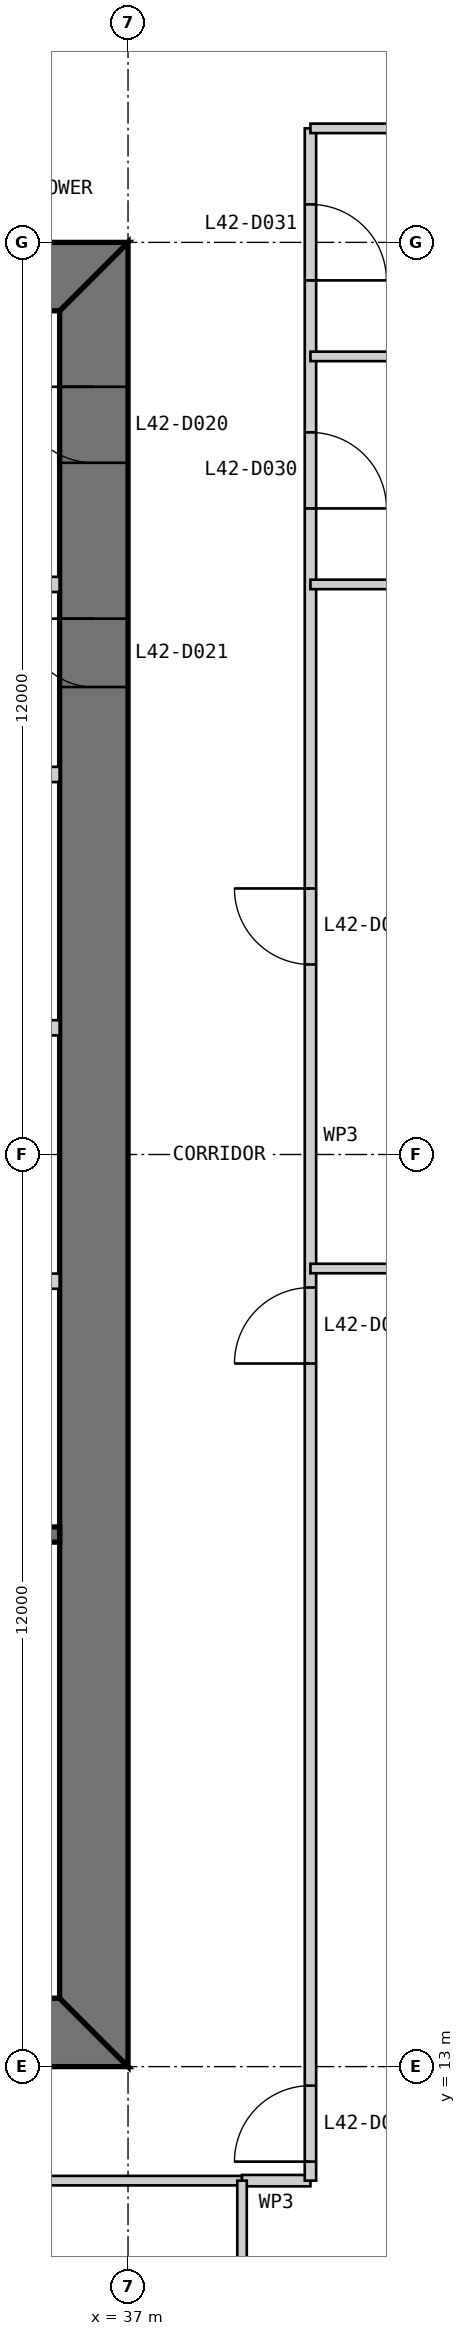
"""IFC4 building model, lengths in metres.
Left out: names, types, materials, properties, quantities, classifications, styles, units other than length and angle.
Written with IfcOpenShell. Run it as: python <this file> out.ifc"""

import sys

from ifc_helpers import new_model, si_unit, direction, frame, frame_2d, origin, place, context, subcontext, project, spatial, polyline, rectangle, outline, extrude, element, fill, save


model = new_model("IFC4")
c1 = context("Model", 3, precision=1e-05, world=origin(), true_north=direction((0.0, 1.0)))
c2 = subcontext(c1, "Body", "Model", "MODEL_VIEW")
j1 = project(units=[si_unit("LENGTHUNIT", "METRE"), si_unit("PLANEANGLEUNIT", "RADIAN")], contexts=[c1])
p1 = place(None, origin())
s1 = spatial("IfcSite", under=j1, at=p1, CompositionType="ELEMENT")
p2 = place(p1, origin())
s2 = spatial("IfcBuilding", under=s1, at=p2, CompositionType="ELEMENT")
p3 = place(p2, frame((0.0, 0.0, 181.8)))
s3 = spatial("IfcBuildingStorey", under=s2, at=p3, CompositionType="ELEMENT", Elevation=181.8)
p4 = place(p3, frame((13.0, 13.45, 0.0), z_axis=(0.0, 0.0, 1.0), x_axis=(1.0, 0.0, 0.0)))
e1 = element("IfcWall", 1, at=p4, inside=s3, PredefinedType="SHEAR", context=c2, shape_type="SweptSolid", body=[
    extrude(outline(polyline([(0.0, -0.45), (24.0, -0.45), (23.1, 0.45), (0.9, 0.45), (0.0, -0.45)])), origin(), (0.0, 0.0, 1.0), 4.0),
])
p5 = place(p4, frame((4.9, 0.0, 0.0)))
e2 = element("IfcOpeningElement", 2, at=p5, cuts=e1, PredefinedType="OPENING", context=c2, shape_type="SweptSolid", body=[
    extrude(rectangle(XDim=1.0, YDim=2.2, at=frame_2d((0.5, 1.1))), frame((0.0, 0.46, 0.0), z_axis=(0.0, -1.0, 0.0), x_axis=(1.0, 0.0, 0.0)), (0.0, 0.0, 1.0), 0.92),
])
p6 = place(p4, frame((8.9, 0.0, 0.0)))
e3 = element("IfcOpeningElement", 3, at=p6, cuts=e1, PredefinedType="OPENING", context=c2, shape_type="SweptSolid", body=[
    extrude(rectangle(XDim=1.1, YDim=2.2, at=frame_2d((0.55, 1.1))), frame((0.0, 0.46, 0.0), z_axis=(0.0, -1.0, 0.0), x_axis=(1.0, 0.0, 0.0)), (0.0, 0.0, 1.0), 0.92),
])
p7 = place(p4, frame((15.05, 0.0, 0.0)))
e4 = element("IfcOpeningElement", 4, at=p7, cuts=e1, PredefinedType="OPENING", context=c2, shape_type="SweptSolid", body=[
    extrude(rectangle(XDim=0.9, YDim=2.2, at=frame_2d((0.45, 1.1))), frame((0.0, 0.46, 0.0), z_axis=(0.0, -1.0, 0.0), x_axis=(1.0, 0.0, 0.0)), (0.0, 0.0, 1.0), 0.92),
])
p8 = place(p4, frame((17.9, 0.0, 0.0)))
e5 = element("IfcOpeningElement", 5, at=p8, cuts=e1, PredefinedType="OPENING", context=c2, shape_type="SweptSolid", body=[
    extrude(rectangle(XDim=1.0, YDim=2.2, at=frame_2d((0.5, 1.1))), frame((0.0, 0.46, 0.0), z_axis=(0.0, -1.0, 0.0), x_axis=(1.0, 0.0, 0.0)), (0.0, 0.0, 1.0), 0.92),
])
p9 = place(p4, frame((21.4, 0.0, 0.0)))
e6 = element("IfcOpeningElement", 6, at=p9, cuts=e1, PredefinedType="OPENING", context=c2, shape_type="SweptSolid", body=[
    extrude(rectangle(XDim=1.0, YDim=2.2, at=frame_2d((0.5, 1.1))), frame((0.0, 0.46, 0.0), z_axis=(0.0, -1.0, 0.0), x_axis=(1.0, 0.0, 0.0)), (0.0, 0.0, 1.0), 0.92),
])
p10 = place(p3, frame((36.55, 13.9, 0.0), z_axis=(0.0, 0.0, 1.0), x_axis=(0.0, 1.0, 0.0)))
e7 = element("IfcWall", 7, at=p10, inside=s3, PredefinedType="SHEAR", context=c2, shape_type="SweptSolid", body=[
    extrude(outline(polyline([(-0.9, -0.45), (23.1, -0.45), (22.2, 0.45), (0.0, 0.45), (-0.9, -0.45)])), origin(), (0.0, 0.0, 1.0), 4.0),
])
p11 = place(p10, frame((20.2, 0.0, 0.0)))
e8 = element("IfcOpeningElement", 8, at=p11, cuts=e7, PredefinedType="OPENING", context=c2, shape_type="SweptSolid", body=[
    extrude(rectangle(XDim=1.0, YDim=2.2, at=frame_2d((0.5, 1.1))), frame((0.0, 0.46, 0.0), z_axis=(0.0, -1.0, 0.0), x_axis=(1.0, 0.0, 0.0)), (0.0, 0.0, 1.0), 0.92),
])
p12 = place(p10, frame((17.25, 0.0, 0.0)))
e9 = element("IfcOpeningElement", 9, at=p12, cuts=e7, PredefinedType="OPENING", context=c2, shape_type="SweptSolid", body=[
    extrude(rectangle(XDim=0.9, YDim=2.2, at=frame_2d((0.45, 1.1))), frame((0.0, 0.46, 0.0), z_axis=(0.0, -1.0, 0.0), x_axis=(1.0, 0.0, 0.0)), (0.0, 0.0, 1.0), 0.92),
])
p13 = place(p3, frame((37.0, 36.55, 0.0), z_axis=(0.0, 0.0, 1.0), x_axis=(-1.0, 0.0, 0.0)))
e10 = element("IfcWall", 10, at=p13, inside=s3, PredefinedType="SHEAR", context=c2, shape_type="SweptSolid", body=[
    extrude(outline(polyline([(0.0, -0.45), (24.0, -0.45), (23.1, 0.45), (0.9, 0.45), (0.0, -0.45)])), origin(), (0.0, 0.0, 1.0), 4.0),
])
p14 = place(p13, frame((4.9, 0.0, 0.0)))
e11 = element("IfcOpeningElement", 11, at=p14, cuts=e10, PredefinedType="OPENING", context=c2, shape_type="SweptSolid", body=[
    extrude(rectangle(XDim=1.0, YDim=2.2, at=frame_2d((0.5, 1.1))), frame((0.0, 0.46, 0.0), z_axis=(0.0, -1.0, 0.0), x_axis=(1.0, 0.0, 0.0)), (0.0, 0.0, 1.0), 0.92),
])
p15 = place(p13, frame((8.9, 0.0, 0.0)))
e12 = element("IfcOpeningElement", 12, at=p15, cuts=e10, PredefinedType="OPENING", context=c2, shape_type="SweptSolid", body=[
    extrude(rectangle(XDim=1.1, YDim=2.2, at=frame_2d((0.55, 1.1))), frame((0.0, 0.46, 0.0), z_axis=(0.0, -1.0, 0.0), x_axis=(1.0, 0.0, 0.0)), (0.0, 0.0, 1.0), 0.92),
])
p16 = place(p13, frame((15.05, 0.0, 0.0)))
e13 = element("IfcOpeningElement", 13, at=p16, cuts=e10, PredefinedType="OPENING", context=c2, shape_type="SweptSolid", body=[
    extrude(rectangle(XDim=0.9, YDim=2.2, at=frame_2d((0.45, 1.1))), frame((0.0, 0.46, 0.0), z_axis=(0.0, -1.0, 0.0), x_axis=(1.0, 0.0, 0.0)), (0.0, 0.0, 1.0), 0.92),
])
p17 = place(p13, frame((17.9, 0.0, 0.0)))
e14 = element("IfcOpeningElement", 14, at=p17, cuts=e10, PredefinedType="OPENING", context=c2, shape_type="SweptSolid", body=[
    extrude(rectangle(XDim=1.0, YDim=2.2, at=frame_2d((0.5, 1.1))), frame((0.0, 0.46, 0.0), z_axis=(0.0, -1.0, 0.0), x_axis=(1.0, 0.0, 0.0)), (0.0, 0.0, 1.0), 0.92),
])
p18 = place(p13, frame((21.4, 0.0, 0.0)))
e15 = element("IfcOpeningElement", 15, at=p18, cuts=e10, PredefinedType="OPENING", context=c2, shape_type="SweptSolid", body=[
    extrude(rectangle(XDim=1.0, YDim=2.2, at=frame_2d((0.5, 1.1))), frame((0.0, 0.46, 0.0), z_axis=(0.0, -1.0, 0.0), x_axis=(1.0, 0.0, 0.0)), (0.0, 0.0, 1.0), 0.92),
])
p19 = place(p3, frame((20.3, 20.0, 0.0), z_axis=(0.0, 0.0, 1.0), x_axis=(1.0, 0.0, 0.0)))
e16 = element("IfcWall", 16, at=p19, inside=s3, PredefinedType="SOLIDWALL", context=c2, shape_type="SweptSolid", body=[
    extrude(rectangle(XDim=15.8, YDim=0.2, at=frame_2d((7.9, 0.0))), origin(), (0.0, 0.0, 1.0), 3.8),
])
for number, where, z_axis, x_axis in (
    (17, (36.1, 30.0, 0.0), (0.0, 0.0, 1.0), (-1.0, 0.0, 0.0)),
    (18, (36.1, 26.667, 0.0), (0.0, 0.0, 1.0), (-1.0, 0.0, 0.0)),
    (19, (36.1, 23.333, 0.0), (0.0, 0.0, 1.0), (-1.0, 0.0, 0.0)),
    (20, (36.1, 32.5, 0.0), (0.0, 0.0, 1.0), (-1.0, 0.0, 0.0)),
):
    element("IfcWall", number, at=place(p3, frame(where, z_axis=z_axis, x_axis=x_axis)), inside=s3, PredefinedType="PARTITIONING", context=c2, shape_type="SweptSolid", body=[
        extrude(rectangle(XDim=2.8, YDim=0.2, at=frame_2d((1.4, 0.0))), origin(), (0.0, 0.0, 1.0), 3.8),
    ])
p20 = place(p3, frame((35.5, 11.5, 0.0), z_axis=(0.0, 0.0, 1.0), x_axis=(1.0, 0.0, 0.0)))
e21 = element("IfcWall", 21, at=p20, inside=s3, PredefinedType="PARTITIONING", context=c2, shape_type="SweptSolid", body=[
    extrude(rectangle(XDim=3.0, YDim=0.125, at=frame_2d((1.5, 0.0))), origin(), (0.0, 0.0, 1.0), 3.85),
])
p21 = place(p3, frame((38.5, 11.5, 0.0), z_axis=(0.0, 0.0, 1.0), x_axis=(1.0, 0.0, 0.0)))
e22 = element("IfcWall", 22, at=p21, inside=s3, PredefinedType="PARTITIONING", context=c2, shape_type="SweptSolid", body=[
    extrude(rectangle(XDim=0.9, YDim=0.15, at=frame_2d((0.45, 0.0))), origin(), (0.0, 0.0, 1.0), 3.85),
])
p22 = place(p3, frame((39.4, 11.5, 0.0), z_axis=(0.0, 0.0, 1.0), x_axis=(0.0, 1.0, 0.0)))
e23 = element("IfcWall", 23, at=p22, inside=s3, PredefinedType="PARTITIONING", context=c2, shape_type="SweptSolid", body=[
    extrude(rectangle(XDim=27.0, YDim=0.15, at=frame_2d((13.5, 0.0))), origin(), (0.0, 0.0, 1.0), 3.85),
])
p23 = place(p22, frame((16.0, 0.0, 0.0)))
e24 = element("IfcOpeningElement", 24, at=p23, cuts=e23, PredefinedType="OPENING", context=c2, shape_type="SweptSolid", body=[
    extrude(rectangle(XDim=1.0, YDim=2.2, at=frame_2d((0.5, 1.1))), frame((0.0, 0.085, 0.0), z_axis=(0.0, -1.0, 0.0), x_axis=(1.0, 0.0, 0.0)), (0.0, 0.0, 1.0), 0.17),
])
p24 = place(p22, frame((0.25, 0.0, 0.0)))
e25 = element("IfcOpeningElement", 25, at=p24, cuts=e23, PredefinedType="OPENING", context=c2, shape_type="SweptSolid", body=[
    extrude(rectangle(XDim=1.0, YDim=2.2, at=frame_2d((0.5, 1.1))), frame((0.0, 0.085, 0.0), z_axis=(0.0, -1.0, 0.0), x_axis=(1.0, 0.0, 0.0)), (0.0, 0.0, 1.0), 0.17),
])
p25 = place(p22, frame((10.75, 0.0, 0.0)))
e26 = element("IfcOpeningElement", 26, at=p25, cuts=e23, PredefinedType="OPENING", context=c2, shape_type="SweptSolid", body=[
    extrude(rectangle(XDim=1.0, YDim=2.2, at=frame_2d((0.5, 1.1))), frame((0.0, 0.085, 0.0), z_axis=(0.0, -1.0, 0.0), x_axis=(1.0, 0.0, 0.0)), (0.0, 0.0, 1.0), 0.17),
])
p26 = place(p22, frame((22.0, 0.0, 0.0)))
e27 = element("IfcOpeningElement", 27, at=p26, cuts=e23, PredefinedType="OPENING", context=c2, shape_type="SweptSolid", body=[
    extrude(rectangle(XDim=1.0, YDim=2.2, at=frame_2d((0.5, 1.1))), frame((0.0, 0.085, 0.0), z_axis=(0.0, -1.0, 0.0), x_axis=(1.0, 0.0, 0.0)), (0.0, 0.0, 1.0), 0.17),
])
p27 = place(p22, frame((25.0, 0.0, 0.0)))
e28 = element("IfcOpeningElement", 28, at=p27, cuts=e23, PredefinedType="OPENING", context=c2, shape_type="SweptSolid", body=[
    extrude(rectangle(XDim=1.0, YDim=2.2, at=frame_2d((0.5, 1.1))), frame((0.0, 0.085, 0.0), z_axis=(0.0, -1.0, 0.0), x_axis=(1.0, 0.0, 0.0)), (0.0, 0.0, 1.0), 0.17),
])
p28 = place(p3, frame((38.5, 0.15, 0.0), z_axis=(0.0, 0.0, 1.0), x_axis=(0.0, 1.0, 0.0)))
e29 = element("IfcWall", 29, at=p28, inside=s3, PredefinedType="PARTITIONING", context=c2, shape_type="SweptSolid", body=[
    extrude(rectangle(XDim=11.35, YDim=0.125, at=frame_2d((5.675, 0.0))), origin(), (0.0, 0.0, 1.0), 3.85),
])
p29 = place(p3, frame((46.0, 23.5, 0.0), z_axis=(0.0, 0.0, 1.0), x_axis=(-1.0, 0.0, 0.0)))
e30 = element("IfcWall", 30, at=p29, inside=s3, PredefinedType="PARTITIONING", context=c2, shape_type="SweptSolid", body=[
    extrude(rectangle(XDim=6.6, YDim=0.125, at=frame_2d((3.3, 0.0))), origin(), (0.0, 0.0, 1.0), 3.85),
])
p30 = place(p3, frame((49.85, 32.5, 0.0), z_axis=(0.0, 0.0, 1.0), x_axis=(-1.0, 0.0, 0.0)))
e31 = element("IfcWall", 31, at=p30, inside=s3, PredefinedType="PARTITIONING", context=c2, shape_type="SweptSolid", body=[
    extrude(rectangle(XDim=10.45, YDim=0.125, at=frame_2d((5.225, 0.0))), origin(), (0.0, 0.0, 1.0), 3.85),
])
p31 = place(p3, frame((46.0, 35.5, 0.0), z_axis=(0.0, 0.0, 1.0), x_axis=(-1.0, 0.0, 0.0)))
e32 = element("IfcWall", 32, at=p31, inside=s3, PredefinedType="PARTITIONING", context=c2, shape_type="SweptSolid", body=[
    extrude(rectangle(XDim=6.6, YDim=0.125, at=frame_2d((3.3, 0.0))), origin(), (0.0, 0.0, 1.0), 3.85),
])
p32 = place(p3, frame((49.85, 38.5, 0.0), z_axis=(0.0, 0.0, 1.0), x_axis=(-1.0, 0.0, 0.0)))
e33 = element("IfcWall", 33, at=p32, inside=s3, PredefinedType="PARTITIONING", context=c2, shape_type="SweptSolid", body=[
    extrude(rectangle(XDim=10.45, YDim=0.125, at=frame_2d((5.225, 0.0))), origin(), (0.0, 0.0, 1.0), 3.85),
])
p33 = place(p11, origin())
e34 = element("IfcDoor", 34, at=p33, inside=s3, OperationType="SINGLE_SWING_RIGHT", PredefinedType="DOOR", context=c2, shape_type="SweptSolid", body=[
    extrude(rectangle(XDim=1.0, YDim=2.2, at=frame_2d((0.5, 1.1))), frame((0.0, 0.025, 0.0), z_axis=(0.0, -1.0, 0.0), x_axis=(1.0, 0.0, 0.0)), (0.0, 0.0, 1.0), 0.05),
    extrude(outline(polyline([(0.0, 0.0), (0.04, 0.0), (0.04, 2.16), (0.96, 2.16), (0.96, 0.0), (1.0, 0.0), (1.0, 2.2), (0.0, 2.2), (0.0, 0.0)])), frame((0.0, 0.3, 0.0), z_axis=(0.0, -1.0, 0.0), x_axis=(1.0, 0.0, 0.0)), (0.0, 0.0, 1.0), 0.6),
])
fill(e8, e34)
p34 = place(p12, origin())
e35 = element("IfcDoor", 35, at=p34, inside=s3, OperationType="SINGLE_SWING_RIGHT", PredefinedType="DOOR", context=c2, shape_type="SweptSolid", body=[
    extrude(rectangle(XDim=0.9, YDim=2.2, at=frame_2d((0.45, 1.1))), frame((0.0, 0.025, 0.0), z_axis=(0.0, -1.0, 0.0), x_axis=(1.0, 0.0, 0.0)), (0.0, 0.0, 1.0), 0.05),
    extrude(outline(polyline([(0.0, 0.0), (0.04, 0.0), (0.04, 2.16), (0.86, 2.16), (0.86, 0.0), (0.9, 0.0), (0.9, 2.2), (0.0, 2.2), (0.0, 0.0)])), frame((0.0, 0.3, 0.0), z_axis=(0.0, -1.0, 0.0), x_axis=(1.0, 0.0, 0.0)), (0.0, 0.0, 1.0), 0.6),
])
fill(e9, e35)
p35 = place(p23, origin())
e36 = element("IfcDoor", 36, at=p35, inside=s3, OperationType="SINGLE_SWING_RIGHT", PredefinedType="DOOR", context=c2, shape_type="SweptSolid", body=[
    extrude(rectangle(XDim=1.0, YDim=2.2, at=frame_2d((0.5, 1.1))), frame((0.0, 0.025, 0.0), z_axis=(0.0, -1.0, 0.0), x_axis=(1.0, 0.0, 0.0)), (0.0, 0.0, 1.0), 0.05),
])
fill(e24, e36)
p36 = place(p24, origin())
e37 = element("IfcDoor", 37, at=p36, inside=s3, OperationType="SINGLE_SWING_LEFT", PredefinedType="DOOR", context=c2, shape_type="SweptSolid", body=[
    extrude(rectangle(XDim=1.0, YDim=2.2, at=frame_2d((0.5, 1.1))), frame((0.0, 0.025, 0.0), z_axis=(0.0, -1.0, 0.0), x_axis=(1.0, 0.0, 0.0)), (0.0, 0.0, 1.0), 0.05),
])
fill(e25, e37)
p37 = place(p25, origin())
e38 = element("IfcDoor", 38, at=p37, inside=s3, OperationType="SINGLE_SWING_LEFT", PredefinedType="DOOR", context=c2, shape_type="SweptSolid", body=[
    extrude(rectangle(XDim=1.0, YDim=2.2, at=frame_2d((0.5, 1.1))), frame((0.0, 0.025, 0.0), z_axis=(0.0, -1.0, 0.0), x_axis=(1.0, 0.0, 0.0)), (0.0, 0.0, 1.0), 0.05),
])
fill(e26, e38)
p38 = place(p26, frame((1.0, 0.0, 0.0), z_axis=(0.0, 0.0, 1.0), x_axis=(-1.0, 0.0, 0.0)))
e39 = element("IfcDoor", 39, at=p38, inside=s3, OperationType="SINGLE_SWING_RIGHT", PredefinedType="DOOR", context=c2, shape_type="SweptSolid", body=[
    extrude(rectangle(XDim=1.0, YDim=2.2, at=frame_2d((0.5, 1.1))), frame((0.0, 0.025, 0.0), z_axis=(0.0, -1.0, 0.0), x_axis=(1.0, 0.0, 0.0)), (0.0, 0.0, 1.0), 0.05),
])
fill(e27, e39)
p39 = place(p27, frame((1.0, 0.0, 0.0), z_axis=(0.0, 0.0, 1.0), x_axis=(-1.0, 0.0, 0.0)))
e40 = element("IfcDoor", 40, at=p39, inside=s3, OperationType="SINGLE_SWING_RIGHT", PredefinedType="DOOR", context=c2, shape_type="SweptSolid", body=[
    extrude(rectangle(XDim=1.0, YDim=2.2, at=frame_2d((0.5, 1.1))), frame((0.0, 0.025, 0.0), z_axis=(0.0, -1.0, 0.0), x_axis=(1.0, 0.0, 0.0)), (0.0, 0.0, 1.0), 0.05),
])
fill(e28, e40)
save(model, sys.argv[1])
